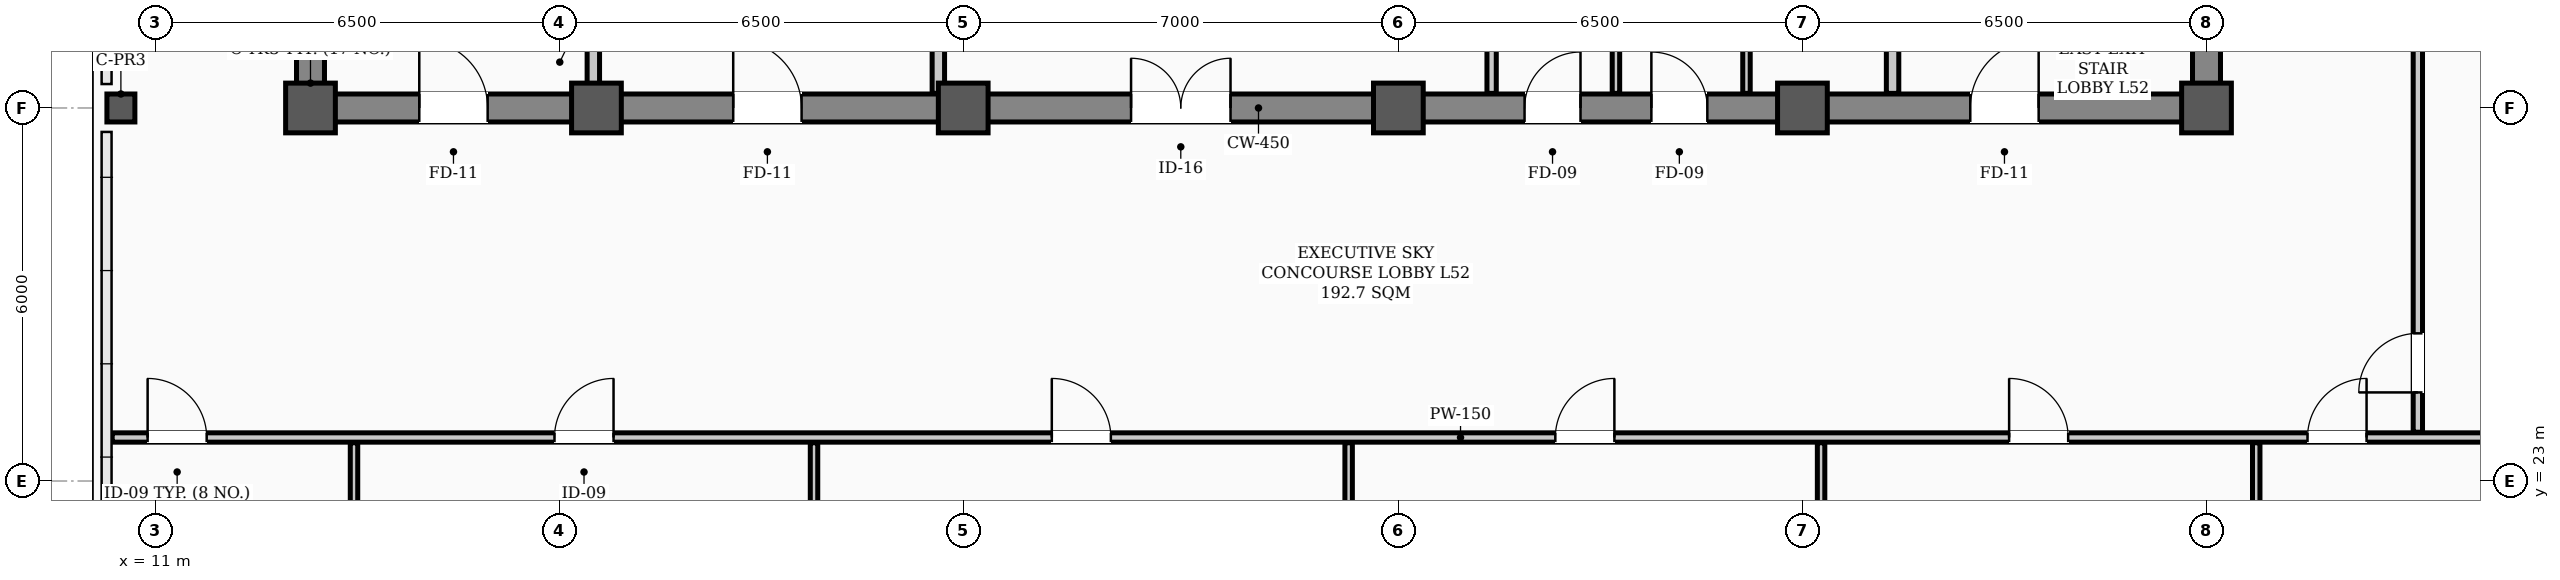
"""IFC4 building model, lengths in metres.
Left out: names, types, materials, properties, quantities, classifications, styles, units other than length and angle.
Written with IfcOpenShell. Run it as: python <this file> out.ifc"""

import sys

from ifc_helpers import new_model, si_unit, direction, frame, frame_2d, origin, origin_2d, place, context, subcontext, project, spatial, rectangle, hollow_rectangle, extrude, element, fill, save


model = new_model("IFC4")
c1 = context("Model", 3, precision=1e-05, world=origin(), true_north=direction((0.0, 1.0)))
c2 = subcontext(c1, "Body", "Model", "MODEL_VIEW")
j1 = project(units=[si_unit("LENGTHUNIT", "METRE"), si_unit("PLANEANGLEUNIT", "RADIAN")], contexts=[c1])
p1 = place(None, origin())
s1 = spatial("IfcSite", under=j1, at=p1, CompositionType="ELEMENT")
p2 = place(p1, origin())
s2 = spatial("IfcBuilding", under=s1, at=p2, CompositionType="ELEMENT")
p3 = place(p2, frame((0.0, 0.0, 211.1)))
s3 = spatial("IfcBuildingStorey", under=s2, at=p3, CompositionType="ELEMENT", Elevation=211.1)
for number, where, z_axis, x_axis in (
    (1, (13.5, 29.0, 0.0), (0.0, 0.0, 1.0), (1.0, 0.0, 0.0)),
    (2, (18.1, 29.0, 0.0), (0.0, 0.0, 1.0), (1.0, 0.0, 0.0)),
    (3, (24.0, 29.0, 0.0), (0.0, 0.0, 1.0), (1.0, 0.0, 0.0)),
    (4, (31.0, 29.0, 0.0), (0.0, 0.0, 1.0), (1.0, 0.0, 0.0)),
    (5, (37.5, 29.0, 0.0), (0.0, 0.0, 1.0), (1.0, 0.0, 0.0)),
    (6, (44.0, 29.0, 0.0), (0.0, 0.0, 1.0), (1.0, 0.0, 0.0)),
):
    element("IfcColumn", number, at=place(p3, frame(where, z_axis=z_axis, x_axis=x_axis)), inside=s3, PredefinedType="COLUMN", context=c2, shape_type="SweptSolid", body=[
        extrude(hollow_rectangle(XDim=0.8, YDim=0.8, WallThickness=0.032, InnerFilletRadius=0.016, OuterFilletRadius=0.048, at=origin_2d()), origin(), (0.0, 0.0, 1.0), 3.9),
    ])
p4 = place(p3, frame((10.45, 29.0, 0.0), z_axis=(0.0, 0.0, 1.0), x_axis=(1.0, 0.0, 0.0)))
e7 = element("IfcColumn", 7, at=p4, inside=s3, PredefinedType="COLUMN", context=c2, shape_type="SweptSolid", body=[
    extrude(hollow_rectangle(XDim=0.45, YDim=0.45, WallThickness=0.022, InnerFilletRadius=0.022, OuterFilletRadius=0.044, at=origin_2d()), origin(), (0.0, 0.0, 1.0), 3.9),
])
p5 = place(p3, frame((13.5, 29.0, 0.0), z_axis=(0.0, 0.0, 1.0), x_axis=(1.0, 0.0, 0.0)))
e8 = element("IfcWall", 8, at=p5, inside=s3, PredefinedType="SHEAR", context=c2, shape_type="SweptSolid", body=[
    extrude(rectangle(XDim=30.5, YDim=0.45, at=frame_2d((15.25, 0.0))), origin(), (0.0, 0.0, 1.0), 3.72),
])
p6 = place(p5, frame((1.75, 0.0, 0.0)))
e9 = element("IfcOpeningElement", 9, at=p6, cuts=e8, PredefinedType="OPENING", context=c2, shape_type="SweptSolid", body=[
    extrude(rectangle(XDim=1.1, YDim=2.08, at=frame_2d((0.55, 1.04))), frame((0.0, 0.235, 0.0), z_axis=(0.0, -1.0, 0.0), x_axis=(1.0, 0.0, 0.0)), (0.0, 0.0, 1.0), 0.47),
])
p7 = place(p5, frame((26.7, 0.0, 0.0)))
e10 = element("IfcOpeningElement", 10, at=p7, cuts=e8, PredefinedType="OPENING", context=c2, shape_type="SweptSolid", body=[
    extrude(rectangle(XDim=1.1, YDim=2.08, at=frame_2d((0.55, 1.04))), frame((0.0, 0.235, 0.0), z_axis=(0.0, -1.0, 0.0), x_axis=(1.0, 0.0, 0.0)), (0.0, 0.0, 1.0), 0.47),
])
p8 = place(p5, frame((6.8, 0.0, 0.0)))
e11 = element("IfcOpeningElement", 11, at=p8, cuts=e8, PredefinedType="OPENING", context=c2, shape_type="SweptSolid", body=[
    extrude(rectangle(XDim=1.1, YDim=2.08, at=frame_2d((0.55, 1.04))), frame((0.0, 0.235, 0.0), z_axis=(0.0, -1.0, 0.0), x_axis=(1.0, 0.0, 0.0)), (0.0, 0.0, 1.0), 0.47),
])
p9 = place(p5, frame((13.2, 0.0, 0.0)))
e12 = element("IfcOpeningElement", 12, at=p9, cuts=e8, PredefinedType="OPENING", context=c2, shape_type="SweptSolid", body=[
    extrude(rectangle(XDim=1.6, YDim=2.08, at=frame_2d((0.8, 1.04))), frame((0.0, 0.235, 0.0), z_axis=(0.0, -1.0, 0.0), x_axis=(1.0, 0.0, 0.0)), (0.0, 0.0, 1.0), 0.47),
])
p10 = place(p5, frame((19.53, 0.0, 0.0)))
e13 = element("IfcOpeningElement", 13, at=p10, cuts=e8, PredefinedType="OPENING", context=c2, shape_type="SweptSolid", body=[
    extrude(rectangle(XDim=0.9, YDim=2.08, at=frame_2d((0.45, 1.04))), frame((0.0, 0.235, 0.0), z_axis=(0.0, -1.0, 0.0), x_axis=(1.0, 0.0, 0.0)), (0.0, 0.0, 1.0), 0.47),
])
p11 = place(p5, frame((21.57, 0.0, 0.0)))
e14 = element("IfcOpeningElement", 14, at=p11, cuts=e8, PredefinedType="OPENING", context=c2, shape_type="SweptSolid", body=[
    extrude(rectangle(XDim=0.9, YDim=2.08, at=frame_2d((0.45, 1.04))), frame((0.0, 0.235, 0.0), z_axis=(0.0, -1.0, 0.0), x_axis=(1.0, 0.0, 0.0)), (0.0, 0.0, 1.0), 0.47),
])
for number, where, z_axis, x_axis in (
    (15, (13.5, 29.35, 0.0), (0.0, 0.0, 1.0), (0.0, 1.0, 0.0)),
    (16, (44.0, 29.35, 0.0), (0.0, 0.0, 1.0), (0.0, 1.0, 0.0)),
):
    element("IfcWall", number, at=place(p3, frame(where, z_axis=z_axis, x_axis=x_axis)), inside=s3, PredefinedType="SHEAR", context=c2, shape_type="SweptSolid", body=[
        extrude(rectangle(XDim=8.6, YDim=0.45, at=frame_2d((4.3, 0.0))), origin(), (0.0, 0.0, 1.0), 3.72),
    ])
p12 = place(p3, frame((10.31, 23.7, 0.0), z_axis=(0.0, 0.0, 1.0), x_axis=(1.0, 0.0, 0.0)))
e17 = element("IfcWall", 17, at=p12, inside=s3, PredefinedType="PARTITIONING", context=c2, shape_type="SweptSolid", body=[
    extrude(rectangle(XDim=43.38, YDim=0.15, at=frame_2d((21.69, 0.0))), origin(), (0.0, 0.0, 1.0), 3.2),
])
p13 = place(p12, frame((0.57, 0.0, 0.0)))
e18 = element("IfcOpeningElement", 18, at=p13, cuts=e17, PredefinedType="OPENING", context=c2, shape_type="SweptSolid", body=[
    extrude(rectangle(XDim=0.95, YDim=2.08, at=frame_2d((0.475, 1.04))), frame((0.0, 0.085, 0.0), z_axis=(0.0, -1.0, 0.0), x_axis=(1.0, 0.0, 0.0)), (0.0, 0.0, 1.0), 0.17),
])
p14 = place(p12, frame((7.115, 0.0, 0.0)))
e19 = element("IfcOpeningElement", 19, at=p14, cuts=e17, PredefinedType="OPENING", context=c2, shape_type="SweptSolid", body=[
    extrude(rectangle(XDim=0.95, YDim=2.08, at=frame_2d((0.475, 1.04))), frame((0.0, 0.085, 0.0), z_axis=(0.0, -1.0, 0.0), x_axis=(1.0, 0.0, 0.0)), (0.0, 0.0, 1.0), 0.17),
])
p15 = place(p12, frame((15.115, 0.0, 0.0)))
e20 = element("IfcOpeningElement", 20, at=p15, cuts=e17, PredefinedType="OPENING", context=c2, shape_type="SweptSolid", body=[
    extrude(rectangle(XDim=0.95, YDim=2.08, at=frame_2d((0.475, 1.04))), frame((0.0, 0.085, 0.0), z_axis=(0.0, -1.0, 0.0), x_axis=(1.0, 0.0, 0.0)), (0.0, 0.0, 1.0), 0.17),
])
p16 = place(p12, frame((23.215, 0.0, 0.0)))
e21 = element("IfcOpeningElement", 21, at=p16, cuts=e17, PredefinedType="OPENING", context=c2, shape_type="SweptSolid", body=[
    extrude(rectangle(XDim=0.95, YDim=2.08, at=frame_2d((0.475, 1.04))), frame((0.0, 0.085, 0.0), z_axis=(0.0, -1.0, 0.0), x_axis=(1.0, 0.0, 0.0)), (0.0, 0.0, 1.0), 0.17),
])
p17 = place(p12, frame((30.515, 0.0, 0.0)))
e22 = element("IfcOpeningElement", 22, at=p17, cuts=e17, PredefinedType="OPENING", context=c2, shape_type="SweptSolid", body=[
    extrude(rectangle(XDim=0.95, YDim=2.08, at=frame_2d((0.475, 1.04))), frame((0.0, 0.085, 0.0), z_axis=(0.0, -1.0, 0.0), x_axis=(1.0, 0.0, 0.0)), (0.0, 0.0, 1.0), 0.17),
])
p18 = place(p12, frame((35.315, 0.0, 0.0)))
e23 = element("IfcOpeningElement", 23, at=p18, cuts=e17, PredefinedType="OPENING", context=c2, shape_type="SweptSolid", body=[
    extrude(rectangle(XDim=0.95, YDim=2.08, at=frame_2d((0.475, 1.04))), frame((0.0, 0.085, 0.0), z_axis=(0.0, -1.0, 0.0), x_axis=(1.0, 0.0, 0.0)), (0.0, 0.0, 1.0), 0.17),
])
for number, where, z_axis, x_axis in (
    (24, (18.05, 29.235, 0.0), (0.0, 0.0, 1.0), (0.0, 1.0, 0.0)),
    (25, (38.95, 29.235, 0.0), (0.0, 0.0, 1.0), (0.0, 1.0, 0.0)),
):
    element("IfcWall", number, at=place(p3, frame(where, z_axis=z_axis, x_axis=x_axis)), inside=s3, PredefinedType="STANDARD", context=c2, shape_type="SweptSolid", body=[
        extrude(rectangle(XDim=1.065, YDim=0.2, at=frame_2d((0.532, 0.0))), origin(), (0.0, 0.0, 1.0), 3.35),
    ])
p19 = place(p3, frame((23.6, 29.235, 0.0), z_axis=(0.0, 0.0, 1.0), x_axis=(0.0, 1.0, 0.0)))
e26 = element("IfcWall", 26, at=p19, inside=s3, PredefinedType="STANDARD", context=c2, shape_type="SweptSolid", body=[
    extrude(rectangle(XDim=5.465, YDim=0.2, at=frame_2d((2.732, 0.0))), origin(), (0.0, 0.0, 1.0), 3.2),
])
p20 = place(p3, frame((32.5, 29.235, 0.0), z_axis=(0.0, 0.0, 1.0), x_axis=(0.0, 1.0, 0.0)))
e27 = element("IfcWall", 27, at=p20, inside=s3, PredefinedType="PARTITIONING", context=c2, shape_type="SweptSolid", body=[
    extrude(rectangle(XDim=2.53, YDim=0.15, at=frame_2d((1.265, 0.0))), origin(), (0.0, 0.0, 1.0), 3.35),
])
for number, where, z_axis, x_axis in (
    (28, (36.6, 29.235, 0.0), (0.0, 0.0, 1.0), (0.0, 1.0, 0.0)),
    (29, (34.5, 29.235, 0.0), (0.0, 0.0, 1.0), (0.0, 1.0, 0.0)),
):
    element("IfcWall", number, at=place(p3, frame(where, z_axis=z_axis, x_axis=x_axis)), inside=s3, PredefinedType="PARTITIONING", context=c2, shape_type="SweptSolid", body=[
        extrude(rectangle(XDim=2.53, YDim=0.12, at=frame_2d((1.265, 0.0))), origin(), (0.0, 0.0, 1.0), 3.35),
    ])
p21 = place(p3, frame((47.4, 23.785, 0.0), z_axis=(0.0, 0.0, 1.0), x_axis=(0.0, 1.0, 0.0)))
e30 = element("IfcWall", 30, at=p21, inside=s3, PredefinedType="PARTITIONING", context=c2, shape_type="SweptSolid", body=[
    extrude(rectangle(XDim=13.13, YDim=0.15, at=frame_2d((6.565, 0.0))), origin(), (0.0, 0.0, 1.0), 3.1),
])
p22 = place(p21, frame((0.64, 0.0, 0.0)))
e31 = element("IfcOpeningElement", 31, at=p22, cuts=e30, PredefinedType="OPENING", context=c2, shape_type="SweptSolid", body=[
    extrude(rectangle(XDim=0.95, YDim=2.08, at=frame_2d((0.475, 1.04))), frame((0.0, 0.085, 0.0), z_axis=(0.0, -1.0, 0.0), x_axis=(1.0, 0.0, 0.0)), (0.0, 0.0, 1.0), 0.17),
])
p23 = place(p3, frame((14.2, 11.56, 0.0), z_axis=(0.0, 0.0, 1.0), x_axis=(0.0, 1.0, 0.0)))
e32 = element("IfcWall", 32, at=p23, inside=s3, PredefinedType="PARTITIONING", context=c2, shape_type="SweptSolid", body=[
    extrude(rectangle(XDim=12.055, YDim=0.12, at=frame_2d((6.027, 0.0))), origin(), (0.0, 0.0, 1.0), 3.1),
])
p24 = place(p3, frame((21.6, 13.32, 0.0), z_axis=(0.0, 0.0, 1.0), x_axis=(0.0, 1.0, 0.0)))
e33 = element("IfcWall", 33, at=p24, inside=s3, PredefinedType="PARTITIONING", context=c2, shape_type="SweptSolid", body=[
    extrude(rectangle(XDim=10.295, YDim=0.12, at=frame_2d((5.147, 0.0))), origin(), (0.0, 0.0, 1.0), 3.1),
])
for number, where, z_axis, x_axis in (
    (34, (30.2, 11.56, 0.0), (0.0, 0.0, 1.0), (0.0, 1.0, 0.0)),
    (35, (37.8, 11.56, 0.0), (0.0, 0.0, 1.0), (0.0, 1.0, 0.0)),
    (36, (44.8, 11.56, 0.0), (0.0, 0.0, 1.0), (0.0, 1.0, 0.0)),
):
    element("IfcWall", number, at=place(p3, frame(where, z_axis=z_axis, x_axis=x_axis)), inside=s3, PredefinedType="PARTITIONING", context=c2, shape_type="SweptSolid", body=[
        extrude(rectangle(XDim=12.055, YDim=0.12, at=frame_2d((6.027, 0.0))), origin(), (0.0, 0.0, 1.0), 3.1),
    ])
p25 = place(p6, origin())
e37 = element("IfcDoor", 37, at=p25, inside=s3, OperationType="SINGLE_SWING_LEFT", PredefinedType="DOOR", context=c2, shape_type="SweptSolid", body=[
    extrude(rectangle(XDim=1.1, YDim=2.08, at=frame_2d((0.55, 1.04))), frame((0.0, 0.025, 0.0), z_axis=(0.0, -1.0, 0.0), x_axis=(1.0, 0.0, 0.0)), (0.0, 0.0, 1.0), 0.05),
])
fill(e9, e37)
p26 = place(p7, origin())
e38 = element("IfcDoor", 38, at=p26, inside=s3, OperationType="SINGLE_SWING_RIGHT", PredefinedType="DOOR", context=c2, shape_type="SweptSolid", body=[
    extrude(rectangle(XDim=1.1, YDim=2.08, at=frame_2d((0.55, 1.04))), frame((0.0, 0.025, 0.0), z_axis=(0.0, -1.0, 0.0), x_axis=(1.0, 0.0, 0.0)), (0.0, 0.0, 1.0), 0.05),
])
fill(e10, e38)
p27 = place(p8, origin())
e39 = element("IfcDoor", 39, at=p27, inside=s3, OperationType="SINGLE_SWING_LEFT", PredefinedType="DOOR", context=c2, shape_type="SweptSolid", body=[
    extrude(rectangle(XDim=1.1, YDim=2.08, at=frame_2d((0.55, 1.04))), frame((0.0, 0.025, 0.0), z_axis=(0.0, -1.0, 0.0), x_axis=(1.0, 0.0, 0.0)), (0.0, 0.0, 1.0), 0.05),
])
fill(e11, e39)
p28 = place(p9, origin())
e40 = element("IfcDoor", 40, at=p28, inside=s3, OperationType="DOUBLE_DOOR_SINGLE_SWING", PredefinedType="DOOR", context=c2, shape_type="SweptSolid", body=[
    extrude(rectangle(XDim=1.6, YDim=2.08, at=frame_2d((0.8, 1.04))), frame((0.0, 0.025, 0.0), z_axis=(0.0, -1.0, 0.0), x_axis=(1.0, 0.0, 0.0)), (0.0, 0.0, 1.0), 0.05),
])
fill(e12, e40)
p29 = place(p10, origin())
e41 = element("IfcDoor", 41, at=p29, inside=s3, OperationType="SINGLE_SWING_RIGHT", PredefinedType="DOOR", context=c2, shape_type="SweptSolid", body=[
    extrude(rectangle(XDim=0.9, YDim=2.08, at=frame_2d((0.45, 1.04))), frame((0.0, 0.025, 0.0), z_axis=(0.0, -1.0, 0.0), x_axis=(1.0, 0.0, 0.0)), (0.0, 0.0, 1.0), 0.05),
])
fill(e13, e41)
p30 = place(p11, origin())
e42 = element("IfcDoor", 42, at=p30, inside=s3, OperationType="SINGLE_SWING_LEFT", PredefinedType="DOOR", context=c2, shape_type="SweptSolid", body=[
    extrude(rectangle(XDim=0.9, YDim=2.08, at=frame_2d((0.45, 1.04))), frame((0.0, 0.025, 0.0), z_axis=(0.0, -1.0, 0.0), x_axis=(1.0, 0.0, 0.0)), (0.0, 0.0, 1.0), 0.05),
])
fill(e14, e42)
p31 = place(p13, origin())
e43 = element("IfcDoor", 43, at=p31, inside=s3, OperationType="SINGLE_SWING_LEFT", PredefinedType="DOOR", context=c2, shape_type="SweptSolid", body=[
    extrude(rectangle(XDim=0.95, YDim=2.08, at=frame_2d((0.475, 1.04))), frame((0.0, 0.025, 0.0), z_axis=(0.0, -1.0, 0.0), x_axis=(1.0, 0.0, 0.0)), (0.0, 0.0, 1.0), 0.05),
])
fill(e18, e43)
p32 = place(p14, origin())
e44 = element("IfcDoor", 44, at=p32, inside=s3, OperationType="SINGLE_SWING_RIGHT", PredefinedType="DOOR", context=c2, shape_type="SweptSolid", body=[
    extrude(rectangle(XDim=0.95, YDim=2.08, at=frame_2d((0.475, 1.04))), frame((0.0, 0.025, 0.0), z_axis=(0.0, -1.0, 0.0), x_axis=(1.0, 0.0, 0.0)), (0.0, 0.0, 1.0), 0.05),
])
fill(e19, e44)
p33 = place(p15, origin())
e45 = element("IfcDoor", 45, at=p33, inside=s3, OperationType="SINGLE_SWING_LEFT", PredefinedType="DOOR", context=c2, shape_type="SweptSolid", body=[
    extrude(rectangle(XDim=0.95, YDim=2.08, at=frame_2d((0.475, 1.04))), frame((0.0, 0.025, 0.0), z_axis=(0.0, -1.0, 0.0), x_axis=(1.0, 0.0, 0.0)), (0.0, 0.0, 1.0), 0.05),
])
fill(e20, e45)
p34 = place(p16, origin())
e46 = element("IfcDoor", 46, at=p34, inside=s3, OperationType="SINGLE_SWING_RIGHT", PredefinedType="DOOR", context=c2, shape_type="SweptSolid", body=[
    extrude(rectangle(XDim=0.95, YDim=2.08, at=frame_2d((0.475, 1.04))), frame((0.0, 0.025, 0.0), z_axis=(0.0, -1.0, 0.0), x_axis=(1.0, 0.0, 0.0)), (0.0, 0.0, 1.0), 0.05),
])
fill(e21, e46)
p35 = place(p17, origin())
e47 = element("IfcDoor", 47, at=p35, inside=s3, OperationType="SINGLE_SWING_LEFT", PredefinedType="DOOR", context=c2, shape_type="SweptSolid", body=[
    extrude(rectangle(XDim=0.95, YDim=2.08, at=frame_2d((0.475, 1.04))), frame((0.0, 0.025, 0.0), z_axis=(0.0, -1.0, 0.0), x_axis=(1.0, 0.0, 0.0)), (0.0, 0.0, 1.0), 0.05),
])
fill(e22, e47)
p36 = place(p18, origin())
e48 = element("IfcDoor", 48, at=p36, inside=s3, OperationType="SINGLE_SWING_RIGHT", PredefinedType="DOOR", context=c2, shape_type="SweptSolid", body=[
    extrude(rectangle(XDim=0.95, YDim=2.08, at=frame_2d((0.475, 1.04))), frame((0.0, 0.025, 0.0), z_axis=(0.0, -1.0, 0.0), x_axis=(1.0, 0.0, 0.0)), (0.0, 0.0, 1.0), 0.05),
])
fill(e23, e48)
p37 = place(p22, origin())
e49 = element("IfcDoor", 49, at=p37, inside=s3, OperationType="SINGLE_SWING_LEFT", PredefinedType="DOOR", context=c2, shape_type="SweptSolid", body=[
    extrude(rectangle(XDim=0.95, YDim=2.08, at=frame_2d((0.475, 1.04))), frame((0.0, 0.025, 0.0), z_axis=(0.0, -1.0, 0.0), x_axis=(1.0, 0.0, 0.0)), (0.0, 0.0, 1.0), 0.05),
])
fill(e31, e49)
save(model, sys.argv[1])
